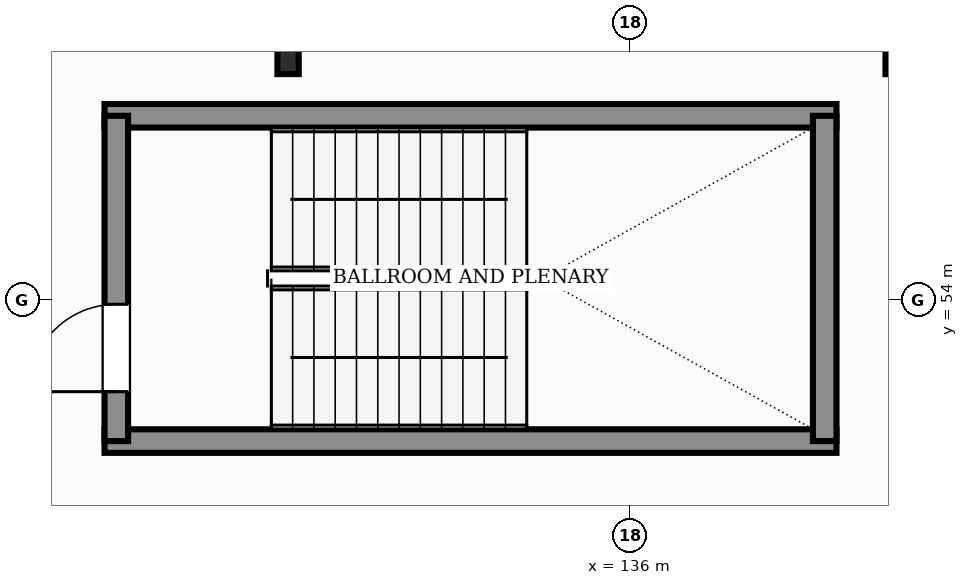
"""IFC4 building model, lengths in metres.
Left out: names, types, materials, properties, quantities, classifications, styles, units other than length and angle.
Written with IfcOpenShell. Run it as: python <this file> out.ifc"""

import sys

from ifc_helpers import new_model, si_unit, direction, frame, frame_2d, origin, origin_2d, place, context, subcontext, project, spatial, rectangle, i_section, extrude, element, fill, save


model = new_model("IFC4")
c1 = context("Model", 3, precision=1e-05, world=origin(), true_north=direction((0.0, 1.0)))
c2 = subcontext(c1, "Body", "Model", "MODEL_VIEW")
j1 = project(units=[si_unit("LENGTHUNIT", "METRE"), si_unit("PLANEANGLEUNIT", "RADIAN")], contexts=[c1])
p1 = place(None, origin())
s1 = spatial("IfcSite", under=j1, at=p1, CompositionType="ELEMENT")
p2 = place(p1, origin())
s2 = spatial("IfcBuilding", under=s1, at=p2, CompositionType="ELEMENT")
p3 = place(p2, frame((0.0, 0.0, 11.4)))
s3 = spatial("IfcBuildingStorey", under=s2, at=p3, CompositionType="ELEMENT", Elevation=11.4)
for number, where, z_axis, x_axis in (
    (1, (131.5, 57.2, 0.0), (0.0, 0.0, 1.0), (1.0, 0.0, 0.0)),
    (2, (139.5, 57.2, 0.0), (0.0, 0.0, 1.0), (1.0, 0.0, 0.0)),
):
    element("IfcColumn", number, at=place(p3, frame(where, z_axis=z_axis, x_axis=x_axis)), inside=s3, PredefinedType="COLUMN", context=c2, shape_type="SweptSolid", body=[
        extrude(i_section(OverallWidth=0.28, OverallDepth=0.463, WebThickness=0.011, FlangeThickness=0.017, FilletRadius=0.012, at=origin_2d()), origin(), (0.0, 0.0, 1.0), 4.8),
    ])
for number, where, z_axis, x_axis in (
    (3, (129.085, 52.14, 0.0), (0.0, 0.0, 1.0), (1.0, 0.0, 0.0)),
    (4, (129.085, 56.42, 0.0), (0.0, 0.0, 1.0), (1.0, 0.0, 0.0)),
):
    element("IfcWall", number, at=place(p3, frame(where, z_axis=z_axis, x_axis=x_axis)), inside=s3, PredefinedType="SHEAR", context=c2, shape_type="SweptSolid", body=[
        extrude(rectangle(XDim=9.63, YDim=0.31, at=frame_2d((4.815, 0.0))), origin(), (0.0, 0.0, 1.0), 4.8),
    ])
p4 = place(p3, frame((129.24, 52.14, 0.0), z_axis=(0.0, 0.0, 1.0), x_axis=(0.0, 1.0, 0.0)))
e5 = element("IfcWall", 5, at=p4, inside=s3, PredefinedType="SHEAR", context=c2, shape_type="SweptSolid", body=[
    extrude(rectangle(XDim=4.28, YDim=0.31, at=frame_2d((2.14, 0.0))), origin(), (0.0, 0.0, 1.0), 4.8),
])
p5 = place(p4, frame((0.65, 0.0, 0.0)))
e6 = element("IfcOpeningElement", 6, at=p5, cuts=e5, PredefinedType="OPENING", context=c2, shape_type="SweptSolid", body=[
    extrude(rectangle(XDim=1.15, YDim=2.2, at=frame_2d((0.575, 1.1))), frame((0.0, 0.165, 0.0), z_axis=(0.0, -1.0, 0.0), x_axis=(1.0, 0.0, 0.0)), (0.0, 0.0, 1.0), 0.33),
])
p6 = place(p3, frame((138.56, 52.14, 0.0), z_axis=(0.0, 0.0, 1.0), x_axis=(0.0, 1.0, 0.0)))
e7 = element("IfcWall", 7, at=p6, inside=s3, PredefinedType="SHEAR", context=c2, shape_type="SweptSolid", body=[
    extrude(rectangle(XDim=4.28, YDim=0.31, at=frame_2d((2.14, 0.0))), origin(), (0.0, 0.0, 1.0), 4.8),
])
p7 = place(p5, origin())
e8 = element("IfcDoor", 8, at=p7, inside=s3, OperationType="SINGLE_SWING_LEFT", PredefinedType="DOOR", context=c2, shape_type="SweptSolid", body=[
    extrude(rectangle(XDim=1.15, YDim=2.2, at=frame_2d((0.575, 1.1))), frame((0.0, 0.025, 0.0), z_axis=(0.0, -1.0, 0.0), x_axis=(1.0, 0.0, 0.0)), (0.0, 0.0, 1.0), 0.05),
])
fill(e6, e8)
save(model, sys.argv[1])
